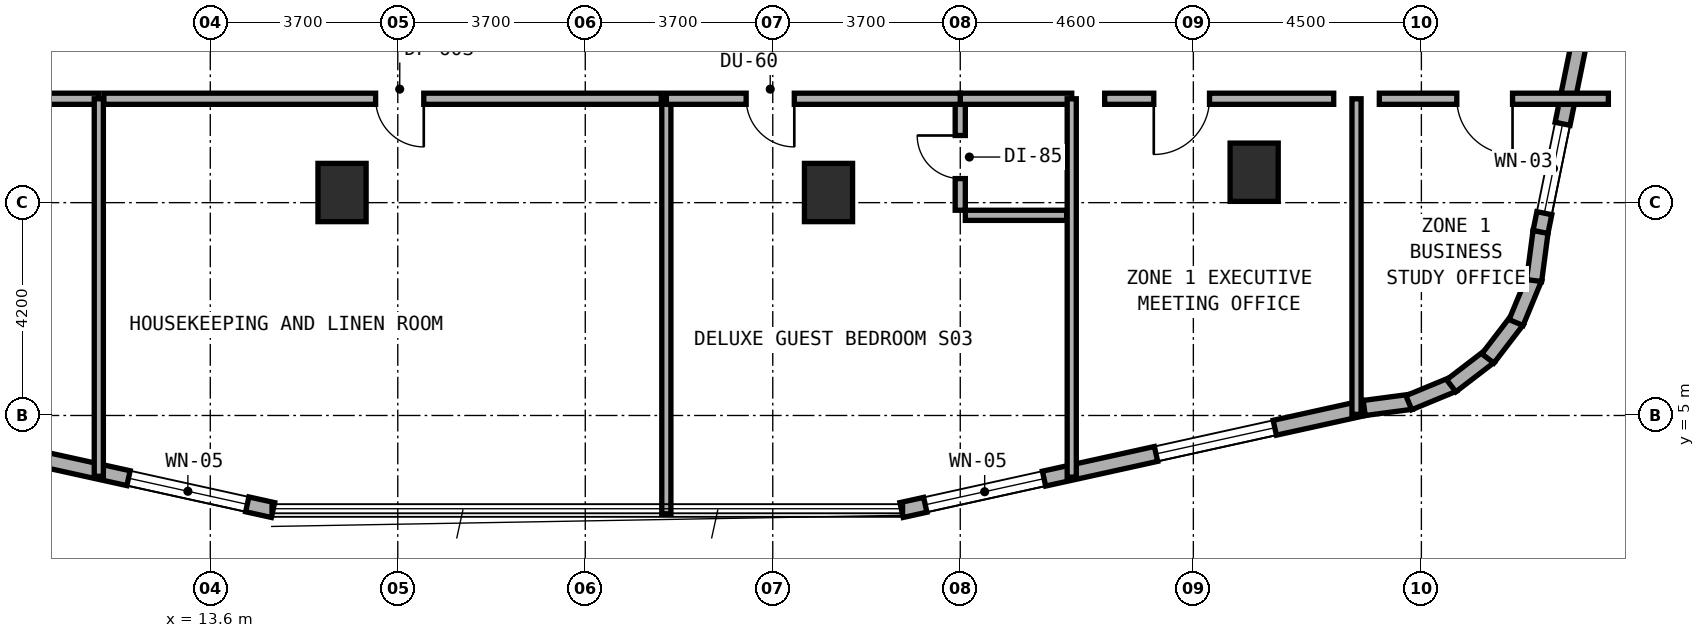
"""IFC4 building model, lengths in metres.
Left out: names, types, materials, properties, quantities, classifications, styles, units other than length and angle.
Written with IfcOpenShell. Run it as: python <this file> out.ifc"""

import sys

from ifc_helpers import new_model, si_unit, direction, frame, frame_2d, origin, origin_2d, place, context, subcontext, project, spatial, rectangle, extrude, element, fill, save


model = new_model("IFC4")
c1 = context("Model", 3, precision=1e-05, world=origin(), true_north=direction((0.0, 1.0)))
c2 = subcontext(c1, "Body", "Model", "MODEL_VIEW")
j1 = project(units=[si_unit("LENGTHUNIT", "METRE"), si_unit("PLANEANGLEUNIT", "RADIAN")], contexts=[c1])
p1 = place(None, origin())
s1 = spatial("IfcSite", under=j1, at=p1, CompositionType="ELEMENT")
p2 = place(p1, origin())
s2 = spatial("IfcBuilding", under=s1, at=p2, CompositionType="ELEMENT")
p3 = place(p2, frame((0.0, 0.0, 73.0)))
s3 = spatial("IfcBuildingStorey", under=s2, at=p3, CompositionType="ELEMENT", Elevation=73.0)
for number, where, z_axis, x_axis in (
    (1, (16.2, 9.4, 0.0), (0.0, 0.0, 1.0), (1.0, 0.0, 0.0)),
    (2, (25.8, 9.4, 0.0), (0.0, 0.0, 1.0), (1.0, 0.0, 0.0)),
    (3, (34.2, 9.8, 0.0), (0.0, 0.0, 1.0), (1.0, 0.0, 0.0)),
):
    element("IfcColumn", number, at=place(p3, frame(where, z_axis=z_axis, x_axis=x_axis)), inside=s3, PredefinedType="COLUMN", context=c2, shape_type="SweptSolid", body=[
        extrude(rectangle(XDim=0.95, YDim=1.15, at=origin_2d()), origin(), (0.0, 0.0, 1.0), 3.5),
    ])
p4 = place(p3, frame((5.704, 5.148, 0.0), z_axis=(0.0, 0.0, 1.0), x_axis=(0.9765437942, -0.215318875183, 0.0)))
e4 = element("IfcWall", 4, at=p4, inside=s3, PredefinedType="STANDARD", context=c2, shape_type="SweptSolid", body=[
    extrude(rectangle(XDim=9.353, YDim=0.3, at=frame_2d((4.677, 0.0))), origin(), (0.0, 0.0, 1.0), 3.22),
])
p5 = place(p4, frame((1.651, 0.0, 0.8)))
e5 = element("IfcOpeningElement", 5, at=p5, cuts=e4, PredefinedType="OPENING", context=c2, shape_type="SweptSolid", body=[
    extrude(rectangle(XDim=2.4, YDim=1.6, at=frame_2d((1.2, 0.8))), frame((0.0, 0.16, 0.0), z_axis=(0.0, -1.0, 0.0), x_axis=(1.0, 0.0, 0.0)), (0.0, 0.0, 1.0), 0.32),
])
p6 = place(p4, frame((6.433, 0.0, 0.8)))
e6 = element("IfcOpeningElement", 6, at=p6, cuts=e4, PredefinedType="OPENING", context=c2, shape_type="SweptSolid", body=[
    extrude(rectangle(XDim=2.4, YDim=1.6, at=frame_2d((1.2, 0.8))), frame((0.0, 0.16, 0.0), z_axis=(0.0, -1.0, 0.0), x_axis=(1.0, 0.0, 0.0)), (0.0, 0.0, 1.0), 0.32),
])
p7 = place(p3, frame((27.242, 3.134, 0.0), z_axis=(0.0, 0.0, 1.0), x_axis=(0.97654500432, 0.215313386808, 0.0)))
e7 = element("IfcWall", 7, at=p7, inside=s3, PredefinedType="STANDARD", context=c2, shape_type="SweptSolid", body=[
    extrude(rectangle(XDim=9.354, YDim=0.3, at=frame_2d((4.677, 0.0))), origin(), (0.0, 0.0, 1.0), 3.22),
])
p8 = place(p7, frame((0.479, 0.0, 0.8)))
e8 = element("IfcOpeningElement", 8, at=p8, cuts=e7, PredefinedType="OPENING", context=c2, shape_type="SweptSolid", body=[
    extrude(rectangle(XDim=2.4, YDim=1.6, at=frame_2d((1.2, 0.8))), frame((0.0, 0.16, 0.0), z_axis=(0.0, -1.0, 0.0), x_axis=(1.0, 0.0, 0.0)), (0.0, 0.0, 1.0), 0.32),
])
p9 = place(p7, frame((5.142, 0.0, 0.8)))
e9 = element("IfcOpeningElement", 9, at=p9, cuts=e7, PredefinedType="OPENING", context=c2, shape_type="SweptSolid", body=[
    extrude(rectangle(XDim=2.4, YDim=1.6, at=frame_2d((1.2, 0.8))), frame((0.0, 0.16, 0.0), z_axis=(0.0, -1.0, 0.0), x_axis=(1.0, 0.0, 0.0)), (0.0, 0.0, 1.0), 0.32),
])
p10 = place(p3, frame((36.372, 5.148, 0.0), z_axis=(0.0, 0.0, 1.0), x_axis=(0.991359246108, 0.131174864804, 0.0)))
e10 = element("IfcWall", 10, at=p10, inside=s3, PredefinedType="STANDARD", context=c2, shape_type="SweptSolid", body=[
    extrude(rectangle(XDim=0.938, YDim=0.3, at=frame_2d((0.469, 0.0))), origin(), (0.0, 0.0, 1.0), 3.22),
])
p11 = place(p3, frame((37.252, 5.252, 0.0), z_axis=(0.0, 0.0, 1.0), x_axis=(0.924019948111, 0.382344263057, 0.0)))
e11 = element("IfcWall", 11, at=p11, inside=s3, PredefinedType="STANDARD", context=c2, shape_type="SweptSolid", body=[
    extrude(rectangle(XDim=0.955, YDim=0.3, at=frame_2d((0.477, 0.0))), origin(), (0.0, 0.0, 1.0), 3.22),
])
p12 = place(p3, frame((38.089, 5.586, 0.0), z_axis=(0.0, 0.0, 1.0), x_axis=(0.793573440799, 0.608474481025, 0.0)))
e12 = element("IfcWall", 12, at=p12, inside=s3, PredefinedType="STANDARD", context=c2, shape_type="SweptSolid", body=[
    extrude(rectangle(XDim=0.955, YDim=0.3, at=frame_2d((0.478, 0.0))), origin(), (0.0, 0.0, 1.0), 3.22),
])
p13 = place(p3, frame((38.812, 6.125, 0.0), z_axis=(0.0, 0.0, 1.0), x_axis=(0.608351047625, 0.793668068435, 0.0)))
e13 = element("IfcWall", 13, at=p13, inside=s3, PredefinedType="STANDARD", context=c2, shape_type="SweptSolid", body=[
    extrude(rectangle(XDim=0.955, YDim=0.3, at=frame_2d((0.478, 0.0))), origin(), (0.0, 0.0, 1.0), 3.22),
])
p14 = place(p3, frame((39.369, 6.834, 0.0), z_axis=(0.0, 0.0, 1.0), x_axis=(0.382344263057, 0.924019948111, 0.0)))
e14 = element("IfcWall", 14, at=p14, inside=s3, PredefinedType="STANDARD", context=c2, shape_type="SweptSolid", body=[
    extrude(rectangle(XDim=0.955, YDim=0.3, at=frame_2d((0.477, 0.0))), origin(), (0.0, 0.0, 1.0), 3.22),
])
p15 = place(p3, frame((39.725, 7.663, 0.0), z_axis=(0.0, 0.0, 1.0), x_axis=(0.130454512571, 0.991454295543, 0.0)))
e15 = element("IfcWall", 15, at=p15, inside=s3, PredefinedType="STANDARD", context=c2, shape_type="SweptSolid", body=[
    extrude(rectangle(XDim=0.973, YDim=0.3, at=frame_2d((0.487, 0.0))), origin(), (0.0, 0.0, 1.0), 3.22),
])
p16 = place(p3, frame((39.851, 8.622, 0.0), z_axis=(0.0, 0.0, 1.0), x_axis=(0.199990901713, 0.979797754249, 0.0)))
e16 = element("IfcWall", 16, at=p16, inside=s3, PredefinedType="STANDARD", context=c2, shape_type="SweptSolid", body=[
    extrude(rectangle(XDim=10.065, YDim=0.3, at=frame_2d((5.033, 0.0))), origin(), (0.0, 0.0, 1.0), 3.22),
])
p17 = place(p16, frame((0.378, 0.0, 0.85)))
e17 = element("IfcOpeningElement", 17, at=p17, cuts=e16, PredefinedType="OPENING", context=c2, shape_type="SweptSolid", body=[
    extrude(rectangle(XDim=1.8, YDim=1.5, at=frame_2d((0.9, 0.75))), frame((0.0, 0.16, 0.0), z_axis=(0.0, -1.0, 0.0), x_axis=(1.0, 0.0, 0.0)), (0.0, 0.0, 1.0), 0.32),
])
p18 = place(p16, frame((5.236, 0.0, 0.8)))
e18 = element("IfcOpeningElement", 18, at=p18, cuts=e16, PredefinedType="OPENING", context=c2, shape_type="SweptSolid", body=[
    extrude(rectangle(XDim=2.4, YDim=1.6, at=frame_2d((1.2, 0.8))), frame((0.0, 0.16, 0.0), z_axis=(0.0, -1.0, 0.0), x_axis=(1.0, 0.0, 0.0)), (0.0, 0.0, 1.0), 0.32),
])
p19 = place(p3, frame((5.55, 11.25, 0.0), z_axis=(0.0, 0.0, 1.0), x_axis=(1.0, 0.0, 0.0)))
e19 = element("IfcWall", 19, at=p19, inside=s3, PredefinedType="SOLIDWALL", context=c2, shape_type="SweptSolid", body=[
    extrude(rectangle(XDim=5.85, YDim=0.22, at=frame_2d((2.925, 0.0))), origin(), (0.0, 0.0, 1.0), 2.495),
])
p20 = place(p19, frame((3.01, 0.0, 0.0)))
e20 = element("IfcOpeningElement", 20, at=p20, cuts=e19, PredefinedType="OPENING", context=c2, shape_type="SweptSolid", body=[
    extrude(rectangle(XDim=0.95, YDim=2.1, at=frame_2d((0.475, 1.05))), frame((0.0, 0.12, 0.0), z_axis=(0.0, -1.0, 0.0), x_axis=(1.0, 0.0, 0.0)), (0.0, 0.0, 1.0), 0.24),
])
p21 = place(p3, frame((11.4, 3.8, 0.0), z_axis=(0.0, 0.0, 1.0), x_axis=(0.0, 1.0, 0.0)))
e21 = element("IfcWall", 21, at=p21, inside=s3, PredefinedType="SOLIDWALL", context=c2, shape_type="SweptSolid", body=[
    extrude(rectangle(XDim=7.45, YDim=0.18, at=frame_2d((3.725, 0.0))), origin(), (0.0, 0.0, 1.0), 2.745),
])
p22 = place(p3, frame((11.5, 11.25, 0.0), z_axis=(0.0, 0.0, 1.0), x_axis=(1.0, 0.0, 0.0)))
e22 = element("IfcWall", 22, at=p22, inside=s3, PredefinedType="SOLIDWALL", context=c2, shape_type="SweptSolid", body=[
    extrude(rectangle(XDim=11.0, YDim=0.22, at=frame_2d((5.5, 0.0))), origin(), (0.0, 0.0, 1.0), 2.495),
])
p23 = place(p22, frame((5.363, 0.0, 0.0)))
e23 = element("IfcOpeningElement", 23, at=p23, cuts=e22, PredefinedType="OPENING", context=c2, shape_type="SweptSolid", body=[
    extrude(rectangle(XDim=0.95, YDim=2.1, at=frame_2d((0.475, 1.05))), frame((0.0, 0.12, 0.0), z_axis=(0.0, -1.0, 0.0), x_axis=(1.0, 0.0, 0.0)), (0.0, 0.0, 1.0), 0.24),
])
p24 = place(p3, frame((22.6, 3.06, 0.0), z_axis=(0.0, 0.0, 1.0), x_axis=(0.0, 1.0, 0.0)))
e24 = element("IfcWall", 24, at=p24, inside=s3, PredefinedType="SOLIDWALL", context=c2, shape_type="SweptSolid", body=[
    extrude(rectangle(XDim=8.19, YDim=0.18, at=frame_2d((4.095, 0.0))), origin(), (0.0, 0.0, 1.0), 2.745),
])
p25 = place(p3, frame((28.4, 9.05, 0.0), z_axis=(0.0, 0.0, 1.0), x_axis=(0.0, 1.0, 0.0)))
e25 = element("IfcWall", 25, at=p25, inside=s3, PredefinedType="PLUMBINGWALL", context=c2, shape_type="SweptSolid", body=[
    extrude(rectangle(XDim=2.1, YDim=0.2, at=frame_2d((1.05, 0.0))), origin(), (0.0, 0.0, 1.0), 2.745),
])
p26 = place(p25, frame((0.625, 0.0, 0.0)))
e26 = element("IfcOpeningElement", 26, at=p26, cuts=e25, PredefinedType="OPENING", context=c2, shape_type="SweptSolid", body=[
    extrude(rectangle(XDim=0.85, YDim=2.1, at=frame_2d((0.425, 1.05))), frame((0.0, 0.11, 0.0), z_axis=(0.0, -1.0, 0.0), x_axis=(1.0, 0.0, 0.0)), (0.0, 0.0, 1.0), 0.22),
])
p27 = place(p3, frame((28.5, 8.95, 0.0), z_axis=(0.0, 0.0, 1.0), x_axis=(1.0, 0.0, 0.0)))
e27 = element("IfcWall", 27, at=p27, inside=s3, PredefinedType="PLUMBINGWALL", context=c2, shape_type="SweptSolid", body=[
    extrude(rectangle(XDim=2.0, YDim=0.2, at=frame_2d((1.0, 0.0))), origin(), (0.0, 0.0, 1.0), 3.22),
])
p28 = place(p3, frame((28.4, 11.25, 0.0), z_axis=(0.0, 0.0, 1.0), x_axis=(1.0, 0.0, 0.0)))
e28 = element("IfcWall", 28, at=p28, inside=s3, PredefinedType="SOLIDWALL", context=c2, shape_type="SweptSolid", body=[
    extrude(rectangle(XDim=2.2, YDim=0.22, at=frame_2d((1.1, 0.0))), origin(), (0.0, 0.0, 1.0), 2.955),
])
p29 = place(p3, frame((22.6, 11.25, 0.0), z_axis=(0.0, 0.0, 1.0), x_axis=(1.0, 0.0, 0.0)))
e29 = element("IfcWall", 29, at=p29, inside=s3, PredefinedType="SOLIDWALL", context=c2, shape_type="SweptSolid", body=[
    extrude(rectangle(XDim=5.8, YDim=0.22, at=frame_2d((2.9, 0.0))), origin(), (0.0, 0.0, 1.0), 2.495),
])
p30 = place(p29, frame((1.575, 0.0, 0.0)))
e30 = element("IfcOpeningElement", 30, at=p30, cuts=e29, PredefinedType="OPENING", context=c2, shape_type="SweptSolid", body=[
    extrude(rectangle(XDim=0.95, YDim=2.1, at=frame_2d((0.475, 1.05))), frame((0.0, 0.12, 0.0), z_axis=(0.0, -1.0, 0.0), x_axis=(1.0, 0.0, 0.0)), (0.0, 0.0, 1.0), 0.24),
])
p31 = place(p3, frame((30.6, 3.783, 0.0), z_axis=(0.0, 0.0, 1.0), x_axis=(0.0, 1.0, 0.0)))
e31 = element("IfcWall", 31, at=p31, inside=s3, PredefinedType="SOLIDWALL", context=c2, shape_type="SweptSolid", body=[
    extrude(rectangle(XDim=7.467, YDim=0.18, at=frame_2d((3.733, 0.0))), origin(), (0.0, 0.0, 1.0), 2.745),
])
p32 = place(p3, frame((36.22, 5.022, 0.0), z_axis=(0.0, 0.0, 1.0), x_axis=(0.0, 1.0, 0.0)))
e32 = element("IfcWall", 32, at=p32, inside=s3, PredefinedType="SOLIDWALL", context=c2, shape_type="SweptSolid", body=[
    extrude(rectangle(XDim=6.228, YDim=0.18, at=frame_2d((3.114, 0.0))), origin(), (0.0, 0.0, 1.0), 3.22),
])
p33 = place(p3, frame((31.25, 11.25, 0.0), z_axis=(0.0, 0.0, 1.0), x_axis=(1.0, 0.0, 0.0)))
e33 = element("IfcWall", 33, at=p33, inside=s3, PredefinedType="SOLIDWALL", context=c2, shape_type="SweptSolid", body=[
    extrude(rectangle(XDim=4.52, YDim=0.22, at=frame_2d((2.26, 0.0))), origin(), (0.0, 0.0, 1.0), 2.495),
])
p34 = place(p33, frame((0.969, 0.0, 0.0)))
e34 = element("IfcOpeningElement", 34, at=p34, cuts=e33, PredefinedType="OPENING", context=c2, shape_type="SweptSolid", body=[
    extrude(rectangle(XDim=1.1, YDim=2.1, at=frame_2d((0.55, 1.05))), frame((0.0, 0.12, 0.0), z_axis=(0.0, -1.0, 0.0), x_axis=(1.0, 0.0, 0.0)), (0.0, 0.0, 1.0), 0.24),
])
p35 = place(p3, frame((36.67, 11.25, 0.0), z_axis=(0.0, 0.0, 1.0), x_axis=(1.0, 0.0, 0.0)))
e35 = element("IfcWall", 35, at=p35, inside=s3, PredefinedType="SOLIDWALL", context=c2, shape_type="SweptSolid", body=[
    extrude(rectangle(XDim=4.52, YDim=0.22, at=frame_2d((2.26, 0.0))), origin(), (0.0, 0.0, 1.0), 3.22),
])
p36 = place(p35, frame((1.529, 0.0, 0.0)))
e36 = element("IfcOpeningElement", 36, at=p36, cuts=e35, PredefinedType="OPENING", context=c2, shape_type="SweptSolid", body=[
    extrude(rectangle(XDim=1.1, YDim=2.1, at=frame_2d((0.55, 1.05))), frame((0.0, 0.12, 0.0), z_axis=(0.0, -1.0, 0.0), x_axis=(1.0, 0.0, 0.0)), (0.0, 0.0, 1.0), 0.24),
])
p37 = place(p6, origin())
e37 = element("IfcWindow", 37, at=p37, inside=s3, PartitioningType="SINGLE_PANEL", PredefinedType="WINDOW", context=c2, shape_type="SweptSolid", body=[
    extrude(rectangle(XDim=2.4, YDim=1.6, at=frame_2d((1.2, 0.8))), frame((0.0, 0.03, 0.0), z_axis=(0.0, -1.0, 0.0), x_axis=(1.0, 0.0, 0.0)), (0.0, 0.0, 1.0), 0.06),
])
fill(e6, e37)
p38 = place(p8, origin())
e38 = element("IfcWindow", 38, at=p38, inside=s3, PartitioningType="SINGLE_PANEL", PredefinedType="WINDOW", context=c2, shape_type="SweptSolid", body=[
    extrude(rectangle(XDim=2.4, YDim=1.6, at=frame_2d((1.2, 0.8))), frame((0.0, 0.03, 0.0), z_axis=(0.0, -1.0, 0.0), x_axis=(1.0, 0.0, 0.0)), (0.0, 0.0, 1.0), 0.06),
])
fill(e8, e38)
p39 = place(p9, origin())
e39 = element("IfcWindow", 39, at=p39, inside=s3, PartitioningType="SINGLE_PANEL", PredefinedType="WINDOW", context=c2, shape_type="SweptSolid", body=[
    extrude(rectangle(XDim=2.4, YDim=1.6, at=frame_2d((1.2, 0.8))), frame((0.0, 0.03, 0.0), z_axis=(0.0, -1.0, 0.0), x_axis=(1.0, 0.0, 0.0)), (0.0, 0.0, 1.0), 0.06),
])
fill(e9, e39)
p40 = place(p17, origin())
e40 = element("IfcWindow", 40, at=p40, inside=s3, PartitioningType="SINGLE_PANEL", PredefinedType="WINDOW", context=c2, shape_type="SweptSolid", body=[
    extrude(rectangle(XDim=1.8, YDim=1.5, at=frame_2d((0.9, 0.75))), frame((0.0, 0.03, 0.0), z_axis=(0.0, -1.0, 0.0), x_axis=(1.0, 0.0, 0.0)), (0.0, 0.0, 1.0), 0.06),
])
fill(e17, e40)
p41 = place(p23, frame((0.95, 0.0, 0.0), z_axis=(0.0, 0.0, 1.0), x_axis=(-1.0, 0.0, 0.0)))
e41 = element("IfcDoor", 41, at=p41, inside=s3, OperationType="SINGLE_SWING_LEFT", PredefinedType="DOOR", context=c2, shape_type="SweptSolid", body=[
    extrude(rectangle(XDim=0.95, YDim=2.1, at=frame_2d((0.475, 1.05))), frame((0.0, 0.025, 0.0), z_axis=(0.0, -1.0, 0.0), x_axis=(1.0, 0.0, 0.0)), (0.0, 0.0, 1.0), 0.05),
])
fill(e23, e41)
p42 = place(p26, origin())
e42 = element("IfcDoor", 42, at=p42, inside=s3, OperationType="SINGLE_SWING_RIGHT", PredefinedType="DOOR", context=c2, shape_type="SweptSolid", body=[
    extrude(rectangle(XDim=0.85, YDim=2.1, at=frame_2d((0.425, 1.05))), frame((0.0, 0.025, 0.0), z_axis=(0.0, -1.0, 0.0), x_axis=(1.0, 0.0, 0.0)), (0.0, 0.0, 1.0), 0.05),
])
fill(e26, e42)
p43 = place(p30, frame((0.95, 0.0, 0.0), z_axis=(0.0, 0.0, 1.0), x_axis=(-1.0, 0.0, 0.0)))
e43 = element("IfcDoor", 43, at=p43, inside=s3, OperationType="SINGLE_SWING_LEFT", PredefinedType="DOOR", context=c2, shape_type="SweptSolid", body=[
    extrude(rectangle(XDim=0.95, YDim=2.1, at=frame_2d((0.475, 1.05))), frame((0.0, 0.025, 0.0), z_axis=(0.0, -1.0, 0.0), x_axis=(1.0, 0.0, 0.0)), (0.0, 0.0, 1.0), 0.05),
])
fill(e30, e43)
p44 = place(p34, frame((1.1, 0.0, 0.0), z_axis=(0.0, 0.0, 1.0), x_axis=(-1.0, 0.0, 0.0)))
e44 = element("IfcDoor", 44, at=p44, inside=s3, OperationType="SINGLE_SWING_RIGHT", PredefinedType="DOOR", context=c2, shape_type="SweptSolid", body=[
    extrude(rectangle(XDim=1.1, YDim=2.1, at=frame_2d((0.55, 1.05))), frame((0.0, 0.025, 0.0), z_axis=(0.0, -1.0, 0.0), x_axis=(1.0, 0.0, 0.0)), (0.0, 0.0, 1.0), 0.05),
])
fill(e34, e44)
p45 = place(p36, frame((1.1, 0.0, 0.0), z_axis=(0.0, 0.0, 1.0), x_axis=(-1.0, 0.0, 0.0)))
e45 = element("IfcDoor", 45, at=p45, inside=s3, OperationType="SINGLE_SWING_LEFT", PredefinedType="DOOR", context=c2, shape_type="SweptSolid", body=[
    extrude(rectangle(XDim=1.1, YDim=2.1, at=frame_2d((0.55, 1.05))), frame((0.0, 0.025, 0.0), z_axis=(0.0, -1.0, 0.0), x_axis=(1.0, 0.0, 0.0)), (0.0, 0.0, 1.0), 0.05),
])
fill(e36, e45)
save(model, sys.argv[1])
